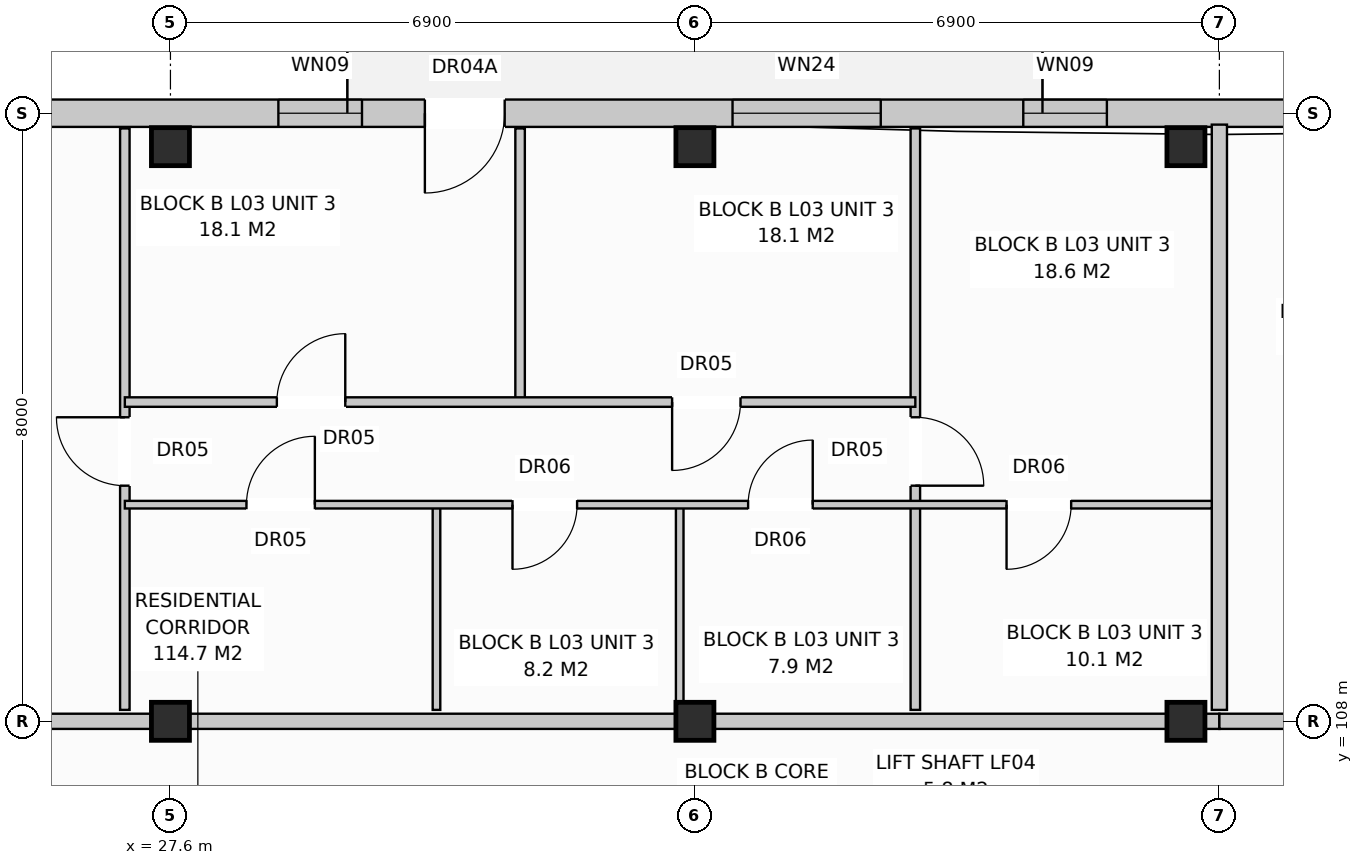
"""IFC4 building model, lengths in metres.
Left out: names, types, materials, properties, quantities, classifications, styles, units other than length and angle.
Written with IfcOpenShell. Run it as: python <this file> out.ifc"""

import sys

from ifc_helpers import new_model, si_unit, direction, frame, frame_2d, origin, origin_with_axes, origin_2d, place, context, subcontext, project, spatial, rectangle, extrude, element, fill, save


model = new_model("IFC4")
c1 = context("Model", 3, precision=1e-05, world=origin(), true_north=direction((0.0, 1.0)))
c2 = subcontext(c1, "Body", "Model", "MODEL_VIEW")
j1 = project(units=[si_unit("LENGTHUNIT", "METRE"), si_unit("PLANEANGLEUNIT", "RADIAN")], contexts=[c1])
p1 = place(None, origin())
s1 = spatial("IfcSite", under=j1, at=p1, CompositionType="ELEMENT")
p2 = place(p1, origin())
s2 = spatial("IfcBuilding", under=s1, at=p2, CompositionType="ELEMENT")
p3 = place(p2, frame((0.0, 0.0, 11.2)))
s3 = spatial("IfcBuildingStorey", under=s2, at=p3, CompositionType="ELEMENT", Elevation=11.2)
for number, where, z_axis, x_axis in (
    (1, (27.6, 108.0, 0.0), (0.0, 0.0, 1.0), (1.0, 0.0, 0.0)),
    (2, (27.6, 115.56, 0.0), (0.0, 0.0, 1.0), (1.0, 0.0, 0.0)),
    (3, (34.5, 108.0, 0.0), (0.0, 0.0, 1.0), (1.0, 0.0, 0.0)),
    (4, (34.5, 115.56, 0.0), (0.0, 0.0, 1.0), (1.0, 0.0, 0.0)),
    (5, (40.96, 108.0, 0.0), (0.0, 0.0, 1.0), (1.0, 0.0, 0.0)),
    (6, (40.96, 115.56, 0.0), (0.0, 0.0, 1.0), (1.0, 0.0, 0.0)),
):
    element("IfcColumn", number, at=place(p3, frame(where, z_axis=z_axis, x_axis=x_axis)), inside=s3, PredefinedType="COLUMN", context=c2, shape_type="SweptSolid", body=[
        extrude(rectangle(XDim=0.5, YDim=0.5, at=origin_2d()), origin(), (0.0, 0.0, 1.0), 3.2),
    ])
p4 = place(p3, frame((0.17, 116.0, 0.0), z_axis=(0.0, 0.0, 1.0), x_axis=(1.0, 0.0, 0.0)))
e7 = element("IfcWall", 7, at=p4, inside=s3, PredefinedType="STANDARD", context=c2, shape_type="SweptSolid", body=[
    extrude(rectangle(XDim=54.86, YDim=0.36, at=frame_2d((27.43, 0.0))), origin(), (0.0, 0.0, 1.0), 2.94),
])
p5 = place(p4, frame((2.777, 0.0, 0.0)))
e8 = element("IfcOpeningElement", 8, at=p5, cuts=e7, PredefinedType="OPENING", context=c2, shape_type="SweptSolid", body=[
    extrude(rectangle(XDim=1.05, YDim=2.12, at=frame_2d((0.525, 1.06))), frame((0.0, 0.192, 0.0), z_axis=(0.0, -1.0, 0.0), x_axis=(1.0, 0.0, 0.0)), (0.0, 0.0, 1.0), 0.384),
])
p6 = place(p4, frame((16.277, 0.0, 0.0)))
e9 = element("IfcOpeningElement", 9, at=p6, cuts=e7, PredefinedType="OPENING", context=c2, shape_type="SweptSolid", body=[
    extrude(rectangle(XDim=1.05, YDim=2.12, at=frame_2d((0.525, 1.06))), frame((0.0, 0.192, 0.0), z_axis=(0.0, -1.0, 0.0), x_axis=(1.0, 0.0, 0.0)), (0.0, 0.0, 1.0), 0.384),
])
p7 = place(p4, frame((30.777, 0.0, 0.0)))
e10 = element("IfcOpeningElement", 10, at=p7, cuts=e7, PredefinedType="OPENING", context=c2, shape_type="SweptSolid", body=[
    extrude(rectangle(XDim=1.05, YDim=2.12, at=frame_2d((0.525, 1.06))), frame((0.0, 0.192, 0.0), z_axis=(0.0, -1.0, 0.0), x_axis=(1.0, 0.0, 0.0)), (0.0, 0.0, 1.0), 0.384),
])
p8 = place(p4, frame((45.157, 0.0, 0.0)))
e11 = element("IfcOpeningElement", 11, at=p8, cuts=e7, PredefinedType="OPENING", context=c2, shape_type="SweptSolid", body=[
    extrude(rectangle(XDim=1.05, YDim=2.12, at=frame_2d((0.525, 1.06))), frame((0.0, 0.192, 0.0), z_axis=(0.0, -1.0, 0.0), x_axis=(1.0, 0.0, 0.0)), (0.0, 0.0, 1.0), 0.384),
])
p9 = place(p4, frame((1.05, 0.0, 0.72)))
e12 = element("IfcOpeningElement", 12, at=p9, cuts=e7, PredefinedType="OPENING", context=c2, shape_type="SweptSolid", body=[
    extrude(rectangle(XDim=1.1, YDim=1.5, at=frame_2d((0.55, 0.75))), frame((0.0, 0.192, 0.0), z_axis=(0.0, -1.0, 0.0), x_axis=(1.0, 0.0, 0.0)), (0.0, 0.0, 1.0), 0.384),
])
p10 = place(p4, frame((4.325, 0.0, 0.8)))
e13 = element("IfcOpeningElement", 13, at=p10, cuts=e7, PredefinedType="OPENING", context=c2, shape_type="SweptSolid", body=[
    extrude(rectangle(XDim=1.95, YDim=1.65, at=frame_2d((0.975, 0.825))), frame((0.0, 0.192, 0.0), z_axis=(0.0, -1.0, 0.0), x_axis=(1.0, 0.0, 0.0)), (0.0, 0.0, 1.0), 0.384),
])
p11 = place(p4, frame((10.45, 0.0, 0.72)))
e14 = element("IfcOpeningElement", 14, at=p11, cuts=e7, PredefinedType="OPENING", context=c2, shape_type="SweptSolid", body=[
    extrude(rectangle(XDim=1.1, YDim=1.5, at=frame_2d((0.55, 0.75))), frame((0.0, 0.192, 0.0), z_axis=(0.0, -1.0, 0.0), x_axis=(1.0, 0.0, 0.0)), (0.0, 0.0, 1.0), 0.384),
])
p12 = place(p4, frame((14.55, 0.0, 0.72)))
e15 = element("IfcOpeningElement", 15, at=p12, cuts=e7, PredefinedType="OPENING", context=c2, shape_type="SweptSolid", body=[
    extrude(rectangle(XDim=1.1, YDim=1.5, at=frame_2d((0.55, 0.75))), frame((0.0, 0.192, 0.0), z_axis=(0.0, -1.0, 0.0), x_axis=(1.0, 0.0, 0.0)), (0.0, 0.0, 1.0), 0.384),
])
p13 = place(p4, frame((18.025, 0.0, 0.8)))
e16 = element("IfcOpeningElement", 16, at=p13, cuts=e7, PredefinedType="OPENING", context=c2, shape_type="SweptSolid", body=[
    extrude(rectangle(XDim=1.95, YDim=1.65, at=frame_2d((0.975, 0.825))), frame((0.0, 0.192, 0.0), z_axis=(0.0, -1.0, 0.0), x_axis=(1.0, 0.0, 0.0)), (0.0, 0.0, 1.0), 0.384),
])
p14 = place(p4, frame((22.8, 0.0, 0.8)))
e17 = element("IfcOpeningElement", 17, at=p14, cuts=e7, PredefinedType="OPENING", context=c2, shape_type="SweptSolid", body=[
    extrude(rectangle(XDim=1.8, YDim=1.7, at=frame_2d((0.9, 0.85))), frame((0.0, 0.192, 0.0), z_axis=(0.0, -1.0, 0.0), x_axis=(1.0, 0.0, 0.0)), (0.0, 0.0, 1.0), 0.384),
])
p15 = place(p4, frame((28.85, 0.0, 0.72)))
e18 = element("IfcOpeningElement", 18, at=p15, cuts=e7, PredefinedType="OPENING", context=c2, shape_type="SweptSolid", body=[
    extrude(rectangle(XDim=1.1, YDim=1.5, at=frame_2d((0.55, 0.75))), frame((0.0, 0.192, 0.0), z_axis=(0.0, -1.0, 0.0), x_axis=(1.0, 0.0, 0.0)), (0.0, 0.0, 1.0), 0.384),
])
p16 = place(p4, frame((34.825, 0.0, 0.8)))
e19 = element("IfcOpeningElement", 19, at=p16, cuts=e7, PredefinedType="OPENING", context=c2, shape_type="SweptSolid", body=[
    extrude(rectangle(XDim=1.95, YDim=1.65, at=frame_2d((0.975, 0.825))), frame((0.0, 0.192, 0.0), z_axis=(0.0, -1.0, 0.0), x_axis=(1.0, 0.0, 0.0)), (0.0, 0.0, 1.0), 0.384),
])
p17 = place(p4, frame((38.65, 0.0, 0.72)))
e20 = element("IfcOpeningElement", 20, at=p17, cuts=e7, PredefinedType="OPENING", context=c2, shape_type="SweptSolid", body=[
    extrude(rectangle(XDim=1.1, YDim=1.5, at=frame_2d((0.55, 0.75))), frame((0.0, 0.192, 0.0), z_axis=(0.0, -1.0, 0.0), x_axis=(1.0, 0.0, 0.0)), (0.0, 0.0, 1.0), 0.384),
])
p18 = place(p4, frame((43.35, 0.0, 0.72)))
e21 = element("IfcOpeningElement", 21, at=p18, cuts=e7, PredefinedType="OPENING", context=c2, shape_type="SweptSolid", body=[
    extrude(rectangle(XDim=1.1, YDim=1.5, at=frame_2d((0.55, 0.75))), frame((0.0, 0.192, 0.0), z_axis=(0.0, -1.0, 0.0), x_axis=(1.0, 0.0, 0.0)), (0.0, 0.0, 1.0), 0.384),
])
p19 = place(p4, frame((48.583, 0.0, 0.8)))
e22 = element("IfcOpeningElement", 22, at=p19, cuts=e7, PredefinedType="OPENING", context=c2, shape_type="SweptSolid", body=[
    extrude(rectangle(XDim=1.95, YDim=1.65, at=frame_2d((0.975, 0.825))), frame((0.0, 0.192, 0.0), z_axis=(0.0, -1.0, 0.0), x_axis=(1.0, 0.0, 0.0)), (0.0, 0.0, 1.0), 0.384),
])
p20 = place(p4, frame((52.25, 0.0, 0.72)))
e23 = element("IfcOpeningElement", 23, at=p20, cuts=e7, PredefinedType="OPENING", context=c2, shape_type="SweptSolid", body=[
    extrude(rectangle(XDim=1.1, YDim=1.5, at=frame_2d((0.55, 0.75))), frame((0.0, 0.192, 0.0), z_axis=(0.0, -1.0, 0.0), x_axis=(1.0, 0.0, 0.0)), (0.0, 0.0, 1.0), 0.384),
])
p21 = place(p3, frame((41.4, 108.15, 0.0), z_axis=(0.0, 0.0, 1.0), x_axis=(0.0, 1.0, 0.0)))
e24 = element("IfcWall", 24, at=p21, inside=s3, PredefinedType="PARTITIONING", context=c2, shape_type="SweptSolid", body=[
    extrude(rectangle(XDim=7.7, YDim=0.2, at=frame_2d((3.85, 0.0))), origin(), (0.0, 0.0, 1.0), 2.94),
])
p22 = place(p3, frame((20.7, 108.0, 0.0), z_axis=(0.0, 0.0, 1.0), x_axis=(1.0, 0.0, 0.0)))
e25 = element("IfcWall", 25, at=p22, inside=s3, PredefinedType="PARTITIONING", context=c2, shape_type="SweptSolid", body=[
    extrude(rectangle(XDim=20.7, YDim=0.2, at=frame_2d((10.35, 0.0))), origin(), (0.0, 0.0, 1.0), 2.38),
])
p23 = place(p22, frame((2.4, 0.0, 0.0)))
e26 = element("IfcOpeningElement", 26, at=p23, cuts=e25, PredefinedType="OPENING", context=c2, shape_type="SweptSolid", body=[
    extrude(rectangle(XDim=0.95, YDim=2.15, at=frame_2d((0.475, 1.075))), frame((0.0, 0.112, 0.0), z_axis=(0.0, -1.0, 0.0), x_axis=(1.0, 0.0, 0.0)), (0.0, 0.0, 1.0), 0.224),
])
p24 = place(p3, frame((27.0, 108.15, 0.0), z_axis=(0.0, 0.0, 1.0), x_axis=(0.0, 1.0, 0.0)))
e27 = element("IfcWall", 27, at=p24, inside=s3, PredefinedType="PARTITIONING", context=c2, shape_type="SweptSolid", body=[
    extrude(rectangle(XDim=7.65, YDim=0.125, at=frame_2d((3.825, 0.0))), origin(), (0.0, 0.0, 1.0), 2.94),
])
p25 = place(p24, frame((2.95, 0.0, 0.0)))
e28 = element("IfcOpeningElement", 28, at=p25, cuts=e27, PredefinedType="OPENING", context=c2, shape_type="SweptSolid", body=[
    extrude(rectangle(XDim=0.9, YDim=2.1, at=frame_2d((0.45, 1.05))), frame((0.0, 0.074, 0.0), z_axis=(0.0, -1.0, 0.0), x_axis=(1.0, 0.0, 0.0)), (0.0, 0.0, 1.0), 0.149),
])
for number, where, z_axis, x_axis in (
    (29, (31.1, 108.15, 0.0), (0.0, 0.0, 1.0), (0.0, 1.0, 0.0)),
    (30, (34.3, 108.15, 0.0), (0.0, 0.0, 1.0), (0.0, 1.0, 0.0)),
):
    element("IfcWall", number, at=place(p3, frame(where, z_axis=z_axis, x_axis=x_axis)), inside=s3, PredefinedType="PARTITIONING", context=c2, shape_type="SweptSolid", body=[
        extrude(rectangle(XDim=2.7, YDim=0.1, at=frame_2d((1.35, 0.0))), origin(), (0.0, 0.0, 1.0), 2.94),
    ])
p26 = place(p3, frame((32.2, 112.2, 0.0), z_axis=(0.0, 0.0, 1.0), x_axis=(0.0, 1.0, 0.0)))
e31 = element("IfcWall", 31, at=p26, inside=s3, PredefinedType="PARTITIONING", context=c2, shape_type="SweptSolid", body=[
    extrude(rectangle(XDim=3.6, YDim=0.125, at=frame_2d((1.8, 0.0))), origin(), (0.0, 0.0, 1.0), 2.94),
])
p27 = place(p3, frame((37.4, 108.15, 0.0), z_axis=(0.0, 0.0, 1.0), x_axis=(0.0, 1.0, 0.0)))
e32 = element("IfcWall", 32, at=p27, inside=s3, PredefinedType="PARTITIONING", context=c2, shape_type="SweptSolid", body=[
    extrude(rectangle(XDim=7.65, YDim=0.125, at=frame_2d((3.825, 0.0))), origin(), (0.0, 0.0, 1.0), 2.94),
])
p28 = place(p27, frame((2.95, 0.0, 0.0)))
e33 = element("IfcOpeningElement", 33, at=p28, cuts=e32, PredefinedType="OPENING", context=c2, shape_type="SweptSolid", body=[
    extrude(rectangle(XDim=0.9, YDim=2.1, at=frame_2d((0.45, 1.05))), frame((0.0, 0.074, 0.0), z_axis=(0.0, -1.0, 0.0), x_axis=(1.0, 0.0, 0.0)), (0.0, 0.0, 1.0), 0.149),
])
p29 = place(p3, frame((27.0, 110.85, 0.0), z_axis=(0.0, 0.0, 1.0), x_axis=(1.0, 0.0, 0.0)))
e34 = element("IfcWall", 34, at=p29, inside=s3, PredefinedType="PARTITIONING", context=c2, shape_type="SweptSolid", body=[
    extrude(rectangle(XDim=14.3, YDim=0.1, at=frame_2d((7.15, 0.0))), origin(), (0.0, 0.0, 1.0), 2.94),
])
p30 = place(p29, frame((1.6, 0.0, 0.0)))
e35 = element("IfcOpeningElement", 35, at=p30, cuts=e34, PredefinedType="OPENING", context=c2, shape_type="SweptSolid", body=[
    extrude(rectangle(XDim=0.9, YDim=2.1, at=frame_2d((0.45, 1.05))), frame((0.0, 0.062, 0.0), z_axis=(0.0, -1.0, 0.0), x_axis=(1.0, 0.0, 0.0)), (0.0, 0.0, 1.0), 0.124),
])
p31 = place(p29, frame((5.1, 0.0, 0.0)))
e36 = element("IfcOpeningElement", 36, at=p31, cuts=e34, PredefinedType="OPENING", context=c2, shape_type="SweptSolid", body=[
    extrude(rectangle(XDim=0.85, YDim=2.05, at=frame_2d((0.425, 1.025))), frame((0.0, 0.062, 0.0), z_axis=(0.0, -1.0, 0.0), x_axis=(1.0, 0.0, 0.0)), (0.0, 0.0, 1.0), 0.124),
])
p32 = place(p29, frame((8.2, 0.0, 0.0)))
e37 = element("IfcOpeningElement", 37, at=p32, cuts=e34, PredefinedType="OPENING", context=c2, shape_type="SweptSolid", body=[
    extrude(rectangle(XDim=0.85, YDim=2.05, at=frame_2d((0.425, 1.025))), frame((0.0, 0.062, 0.0), z_axis=(0.0, -1.0, 0.0), x_axis=(1.0, 0.0, 0.0)), (0.0, 0.0, 1.0), 0.124),
])
p33 = place(p29, frame((11.6, 0.0, 0.0)))
e38 = element("IfcOpeningElement", 38, at=p33, cuts=e34, PredefinedType="OPENING", context=c2, shape_type="SweptSolid", body=[
    extrude(rectangle(XDim=0.85, YDim=2.05, at=frame_2d((0.425, 1.025))), frame((0.0, 0.062, 0.0), z_axis=(0.0, -1.0, 0.0), x_axis=(1.0, 0.0, 0.0)), (0.0, 0.0, 1.0), 0.124),
])
p34 = place(p3, frame((27.0, 112.2, 0.0), z_axis=(0.0, 0.0, 1.0), x_axis=(1.0, 0.0, 0.0)))
e39 = element("IfcWall", 39, at=p34, inside=s3, PredefinedType="PARTITIONING", context=c2, shape_type="SweptSolid", body=[
    extrude(rectangle(XDim=10.4, YDim=0.125, at=frame_2d((5.2, 0.0))), origin(), (0.0, 0.0, 1.0), 2.94),
])
p35 = place(p34, frame((2.0, 0.0, 0.0)))
e40 = element("IfcOpeningElement", 40, at=p35, cuts=e39, PredefinedType="OPENING", context=c2, shape_type="SweptSolid", body=[
    extrude(rectangle(XDim=0.9, YDim=2.1, at=frame_2d((0.45, 1.05))), frame((0.0, 0.074, 0.0), z_axis=(0.0, -1.0, 0.0), x_axis=(1.0, 0.0, 0.0)), (0.0, 0.0, 1.0), 0.149),
])
p36 = place(p34, frame((7.2, 0.0, 0.0)))
e41 = element("IfcOpeningElement", 41, at=p36, cuts=e39, PredefinedType="OPENING", context=c2, shape_type="SweptSolid", body=[
    extrude(rectangle(XDim=0.9, YDim=2.1, at=frame_2d((0.45, 1.05))), frame((0.0, 0.074, 0.0), z_axis=(0.0, -1.0, 0.0), x_axis=(1.0, 0.0, 0.0)), (0.0, 0.0, 1.0), 0.149),
])
p37 = place(p3, frame((41.4, 108.0, 0.0), z_axis=(0.0, 0.0, 1.0), x_axis=(1.0, 0.0, 0.0)))
e42 = element("IfcWall", 42, at=p37, inside=s3, PredefinedType="PARTITIONING", context=c2, shape_type="SweptSolid", body=[
    extrude(rectangle(XDim=13.8, YDim=0.2, at=frame_2d((6.9, 0.0))), origin(), (0.0, 0.0, 1.0), 2.38),
])
p38 = place(p37, frame((2.4, 0.0, 0.0)))
e43 = element("IfcOpeningElement", 43, at=p38, cuts=e42, PredefinedType="OPENING", context=c2, shape_type="SweptSolid", body=[
    extrude(rectangle(XDim=0.95, YDim=2.15, at=frame_2d((0.475, 1.075))), frame((0.0, 0.112, 0.0), z_axis=(0.0, -1.0, 0.0), x_axis=(1.0, 0.0, 0.0)), (0.0, 0.0, 1.0), 0.224),
])
p39 = place(p7, frame((1.05, 0.0, 0.0), z_axis=(0.0, 0.0, 1.0), x_axis=(-1.0, 0.0, 0.0)))
e44 = element("IfcDoor", 44, at=p39, inside=s3, OperationType="SINGLE_SWING_LEFT", PredefinedType="DOOR", context=c2, shape_type="SweptSolid", body=[
    extrude(rectangle(XDim=1.05, YDim=2.12, at=frame_2d((0.525, 1.06))), frame((0.0, 0.025, 0.0), z_axis=(0.0, -1.0, 0.0), x_axis=(1.0, 0.0, 0.0)), (0.0, 0.0, 1.0), 0.05),
])
fill(e10, e44)
p40 = place(p15, origin_with_axes())
e45 = element("IfcWindow", 45, at=p40, inside=s3, PartitioningType="SINGLE_PANEL", PredefinedType="WINDOW", context=c2, shape_type="SweptSolid", body=[
    extrude(rectangle(XDim=1.1, YDim=1.5, at=frame_2d((0.55, 0.75))), frame((0.0, 0.03, 0.0), z_axis=(0.0, -1.0, 0.0), x_axis=(1.0, 0.0, 0.0)), (0.0, 0.0, 1.0), 0.06),
])
fill(e18, e45)
p41 = place(p16, origin_with_axes())
e46 = element("IfcWindow", 46, at=p41, inside=s3, PartitioningType="SINGLE_PANEL", PredefinedType="WINDOW", context=c2, shape_type="SweptSolid", body=[
    extrude(rectangle(XDim=1.95, YDim=1.65, at=frame_2d((0.975, 0.825))), frame((0.0, 0.03, 0.0), z_axis=(0.0, -1.0, 0.0), x_axis=(1.0, 0.0, 0.0)), (0.0, 0.0, 1.0), 0.06),
])
fill(e19, e46)
p42 = place(p17, origin_with_axes())
e47 = element("IfcWindow", 47, at=p42, inside=s3, PartitioningType="SINGLE_PANEL", PredefinedType="WINDOW", context=c2, shape_type="SweptSolid", body=[
    extrude(rectangle(XDim=1.1, YDim=1.5, at=frame_2d((0.55, 0.75))), frame((0.0, 0.03, 0.0), z_axis=(0.0, -1.0, 0.0), x_axis=(1.0, 0.0, 0.0)), (0.0, 0.0, 1.0), 0.06),
])
fill(e20, e47)
p43 = place(p25, origin_with_axes())
e48 = element("IfcDoor", 48, at=p43, inside=s3, OperationType="SINGLE_SWING_RIGHT", PredefinedType="DOOR", context=c2, shape_type="SweptSolid", body=[
    extrude(rectangle(XDim=0.9, YDim=2.1, at=frame_2d((0.45, 1.05))), frame((0.0, 0.025, 0.0), z_axis=(0.0, -1.0, 0.0), x_axis=(1.0, 0.0, 0.0)), (0.0, 0.0, 1.0), 0.05),
])
fill(e28, e48)
p44 = place(p28, frame((0.9, 0.0, 0.0), z_axis=(0.0, 0.0, 1.0), x_axis=(-1.0, 0.0, 0.0)))
e49 = element("IfcDoor", 49, at=p44, inside=s3, OperationType="SINGLE_SWING_LEFT", PredefinedType="DOOR", context=c2, shape_type="SweptSolid", body=[
    extrude(rectangle(XDim=0.9, YDim=2.1, at=frame_2d((0.45, 1.05))), frame((0.0, 0.025, 0.0), z_axis=(0.0, -1.0, 0.0), x_axis=(1.0, 0.0, 0.0)), (0.0, 0.0, 1.0), 0.05),
])
fill(e33, e49)
p45 = place(p30, origin_with_axes())
e50 = element("IfcDoor", 50, at=p45, inside=s3, OperationType="SINGLE_SWING_RIGHT", PredefinedType="DOOR", context=c2, shape_type="SweptSolid", body=[
    extrude(rectangle(XDim=0.9, YDim=2.1, at=frame_2d((0.45, 1.05))), frame((0.0, 0.025, 0.0), z_axis=(0.0, -1.0, 0.0), x_axis=(1.0, 0.0, 0.0)), (0.0, 0.0, 1.0), 0.05),
])
fill(e35, e50)
p46 = place(p31, frame((0.85, 0.0, 0.0), z_axis=(0.0, 0.0, 1.0), x_axis=(-1.0, 0.0, 0.0)))
e51 = element("IfcDoor", 51, at=p46, inside=s3, OperationType="SINGLE_SWING_LEFT", PredefinedType="DOOR", context=c2, shape_type="SweptSolid", body=[
    extrude(rectangle(XDim=0.85, YDim=2.05, at=frame_2d((0.425, 1.025))), frame((0.0, 0.025, 0.0), z_axis=(0.0, -1.0, 0.0), x_axis=(1.0, 0.0, 0.0)), (0.0, 0.0, 1.0), 0.05),
])
fill(e36, e51)
p47 = place(p32, origin_with_axes())
e52 = element("IfcDoor", 52, at=p47, inside=s3, OperationType="SINGLE_SWING_RIGHT", PredefinedType="DOOR", context=c2, shape_type="SweptSolid", body=[
    extrude(rectangle(XDim=0.85, YDim=2.05, at=frame_2d((0.425, 1.025))), frame((0.0, 0.025, 0.0), z_axis=(0.0, -1.0, 0.0), x_axis=(1.0, 0.0, 0.0)), (0.0, 0.0, 1.0), 0.05),
])
fill(e37, e52)
p48 = place(p33, frame((0.85, 0.0, 0.0), z_axis=(0.0, 0.0, 1.0), x_axis=(-1.0, 0.0, 0.0)))
e53 = element("IfcDoor", 53, at=p48, inside=s3, OperationType="SINGLE_SWING_LEFT", PredefinedType="DOOR", context=c2, shape_type="SweptSolid", body=[
    extrude(rectangle(XDim=0.85, YDim=2.05, at=frame_2d((0.425, 1.025))), frame((0.0, 0.025, 0.0), z_axis=(0.0, -1.0, 0.0), x_axis=(1.0, 0.0, 0.0)), (0.0, 0.0, 1.0), 0.05),
])
fill(e38, e53)
p49 = place(p35, origin_with_axes())
e54 = element("IfcDoor", 54, at=p49, inside=s3, OperationType="SINGLE_SWING_RIGHT", PredefinedType="DOOR", context=c2, shape_type="SweptSolid", body=[
    extrude(rectangle(XDim=0.9, YDim=2.1, at=frame_2d((0.45, 1.05))), frame((0.0, 0.025, 0.0), z_axis=(0.0, -1.0, 0.0), x_axis=(1.0, 0.0, 0.0)), (0.0, 0.0, 1.0), 0.05),
])
fill(e40, e54)
p50 = place(p36, frame((0.9, 0.0, 0.0), z_axis=(0.0, 0.0, 1.0), x_axis=(-1.0, 0.0, 0.0)))
e55 = element("IfcDoor", 55, at=p50, inside=s3, OperationType="SINGLE_SWING_LEFT", PredefinedType="DOOR", context=c2, shape_type="SweptSolid", body=[
    extrude(rectangle(XDim=0.9, YDim=2.1, at=frame_2d((0.45, 1.05))), frame((0.0, 0.025, 0.0), z_axis=(0.0, -1.0, 0.0), x_axis=(1.0, 0.0, 0.0)), (0.0, 0.0, 1.0), 0.05),
])
fill(e41, e55)
save(model, sys.argv[1])
